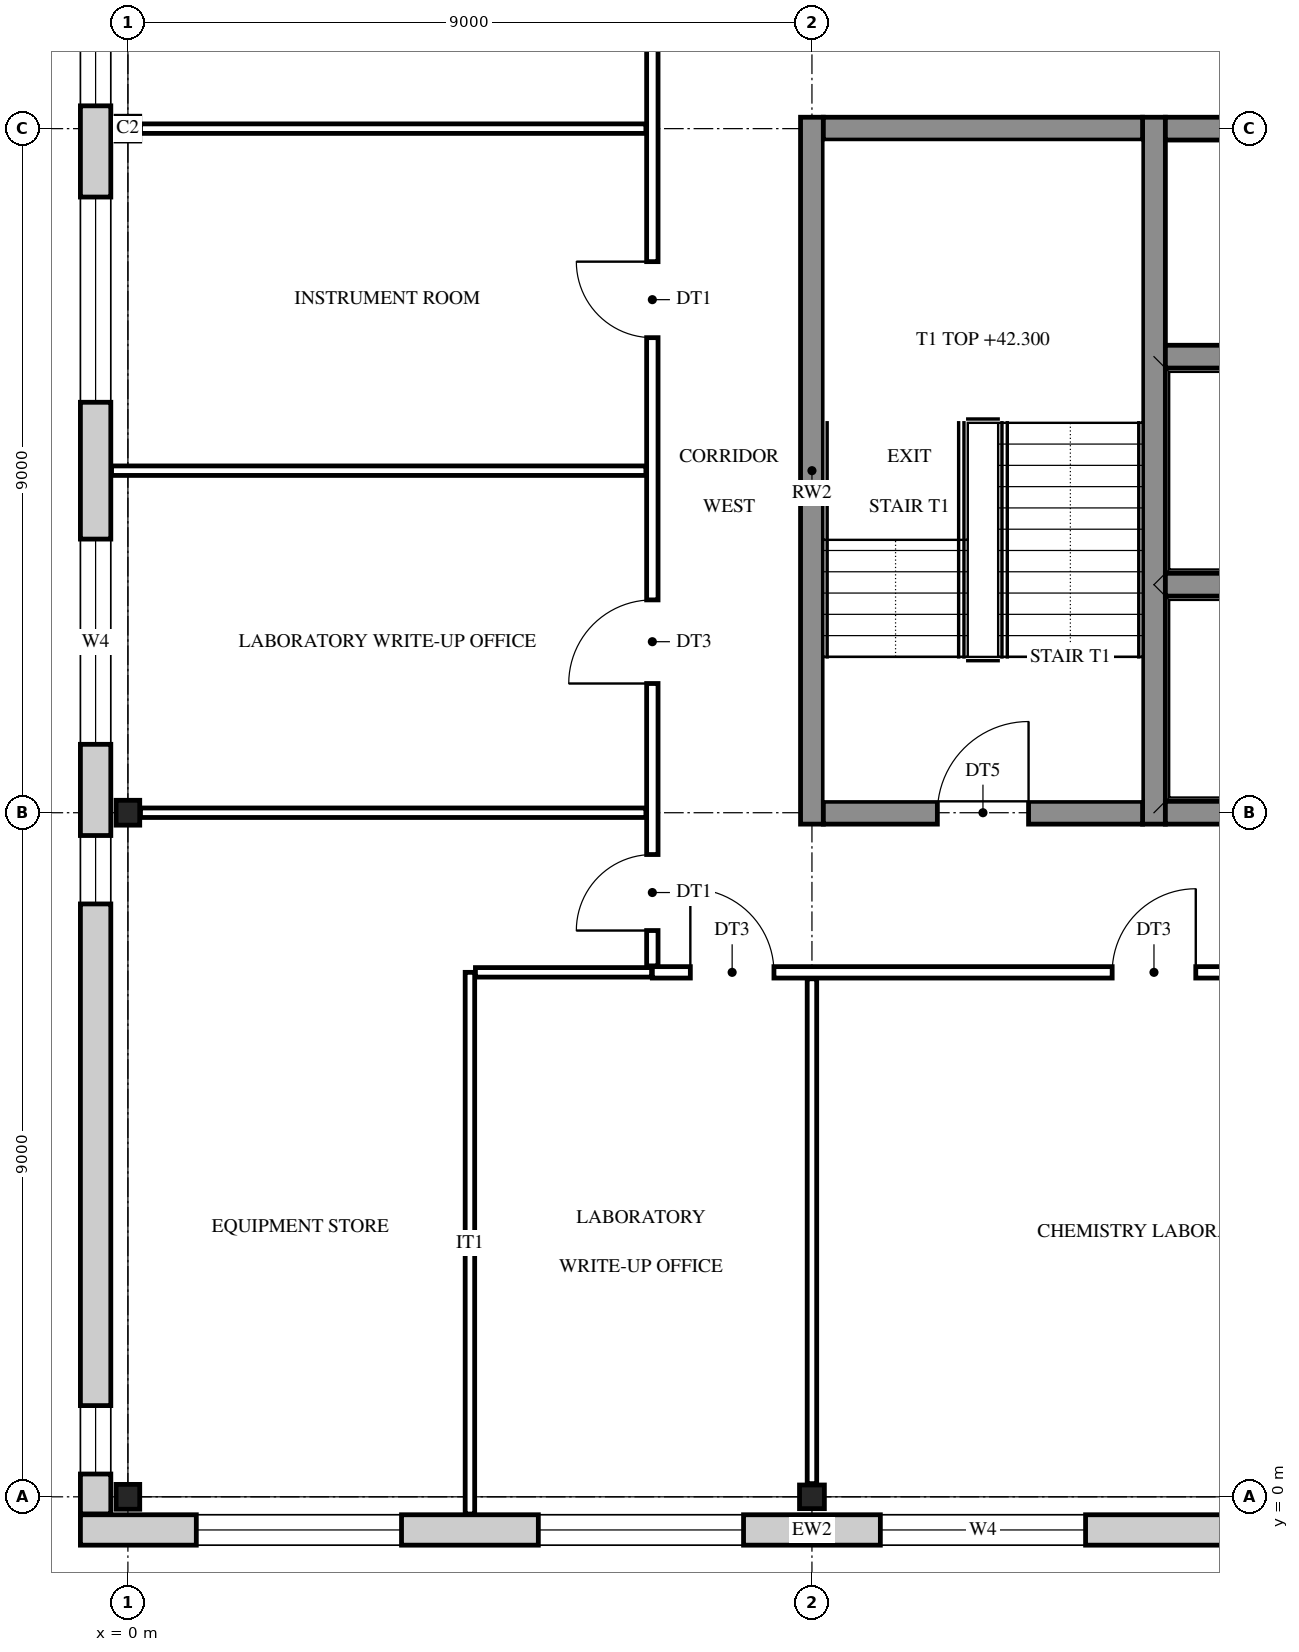
"""IFC4 building model, lengths in metres.
Left out: names, types, materials, properties, quantities, classifications, styles, units other than length and angle.
Written with IfcOpenShell. Run it as: python <this file> out.ifc"""

import sys

from ifc_helpers import new_model, si_unit, direction, frame, frame_2d, origin, origin_2d, place, context, subcontext, project, spatial, rectangle, i_section, extrude, element, fill, save


model = new_model("IFC4")
c1 = context("Model", 3, precision=1e-05, world=origin(), true_north=direction((0.0, 1.0)))
c2 = subcontext(c1, "Body", "Model", "MODEL_VIEW")
j1 = project(units=[si_unit("LENGTHUNIT", "METRE"), si_unit("PLANEANGLEUNIT", "RADIAN")], contexts=[c1])
p1 = place(None, origin())
s1 = spatial("IfcSite", under=j1, at=p1, CompositionType="ELEMENT")
p2 = place(p1, origin())
s2 = spatial("IfcBuilding", under=s1, at=p2, CompositionType="ELEMENT")
p3 = place(p2, frame((0.0, 0.0, 40.2)))
s3 = spatial("IfcBuildingStorey", under=s2, at=p3, CompositionType="ELEMENT", Elevation=40.2)
for number, where, z_axis, x_axis in (
    (1, (0.0, 0.0, 0.0), (0.0, 0.0, 1.0), (1.0, 0.0, 0.0)),
    (2, (0.0, 9.0, 0.0), (0.0, 0.0, 1.0), (1.0, 0.0, 0.0)),
    (3, (0.0, 18.0, 0.0), (0.0, 0.0, 1.0), (1.0, 0.0, 0.0)),
    (4, (9.0, 0.0, 0.0), (0.0, 0.0, 1.0), (0.0, 1.0, 0.0)),
):
    element("IfcColumn", number, at=place(p3, frame(where, z_axis=z_axis, x_axis=x_axis)), inside=s3, PredefinedType="COLUMN", context=c2, shape_type="SweptSolid", body=[
        extrude(i_section(OverallWidth=0.311, OverallDepth=0.327, WebThickness=0.016, FlangeThickness=0.025, FilletRadius=0.017, at=origin_2d()), origin(), (0.0, 0.0, 1.0), 4.2),
    ])
for number, where, z_axis, x_axis in (
    (5, (9.0, 8.85, 0.0), (0.0, 0.0, 1.0), (0.0, 1.0, 0.0)),
    (6, (13.5, 8.85, 0.0), (0.0, 0.0, 1.0), (0.0, 1.0, 0.0)),
):
    element("IfcWall", number, at=place(p3, frame(where, z_axis=z_axis, x_axis=x_axis)), inside=s3, PredefinedType="SHEAR", context=c2, shape_type="SweptSolid", body=[
        extrude(rectangle(XDim=9.3, YDim=0.3, at=frame_2d((4.65, 0.0))), origin(), (0.0, 0.0, 1.0), 4.2),
    ])
p4 = place(p3, frame((9.15, 9.0, 0.0), z_axis=(0.0, 0.0, 1.0), x_axis=(1.0, 0.0, 0.0)))
e7 = element("IfcWall", 7, at=p4, inside=s3, PredefinedType="SHEAR", context=c2, shape_type="SweptSolid", body=[
    extrude(rectangle(XDim=4.2, YDim=0.3, at=frame_2d((2.1, 0.0))), origin(), (0.0, 0.0, 1.0), 4.2),
])
p5 = place(p4, frame((1.5, 0.0, 0.0)))
e8 = element("IfcOpeningElement", 8, at=p5, cuts=e7, PredefinedType="OPENING", context=c2, shape_type="SweptSolid", body=[
    extrude(rectangle(XDim=1.2, YDim=2.1, at=frame_2d((0.6, 1.05))), frame((0.0, 0.16, 0.0), z_axis=(0.0, -1.0, 0.0), x_axis=(1.0, 0.0, 0.0)), (0.0, 0.0, 1.0), 0.32),
])
for number, where, z_axis, x_axis in (
    (9, (13.65, 9.0, 0.0), (0.0, 0.0, 1.0), (1.0, 0.0, 0.0)),
    (10, (13.65, 12.0, 0.0), (0.0, 0.0, 1.0), (1.0, 0.0, 0.0)),
    (11, (13.65, 15.0, 0.0), (0.0, 0.0, 1.0), (1.0, 0.0, 0.0)),
):
    element("IfcWall", number, at=place(p3, frame(where, z_axis=z_axis, x_axis=x_axis)), inside=s3, PredefinedType="SHEAR", context=c2, shape_type="SweptSolid", body=[
        extrude(rectangle(XDim=2.7, YDim=0.3, at=frame_2d((1.35, 0.0))), origin(), (0.0, 0.0, 1.0), 4.2),
    ])
p6 = place(p3, frame((9.15, 18.0, 0.0), z_axis=(0.0, 0.0, 1.0), x_axis=(1.0, 0.0, 0.0)))
e12 = element("IfcWall", 12, at=p6, inside=s3, PredefinedType="SHEAR", context=c2, shape_type="SweptSolid", body=[
    extrude(rectangle(XDim=4.2, YDim=0.3, at=frame_2d((2.1, 0.0))), origin(), (0.0, 0.0, 1.0), 4.2),
])
p7 = place(p3, frame((13.65, 18.0, 0.0), z_axis=(0.0, 0.0, 1.0), x_axis=(1.0, 0.0, 0.0)))
e13 = element("IfcWall", 13, at=p7, inside=s3, PredefinedType="SHEAR", context=c2, shape_type="SweptSolid", body=[
    extrude(rectangle(XDim=2.7, YDim=0.3, at=frame_2d((1.35, 0.0))), origin(), (0.0, 0.0, 1.0), 4.2),
])
p8 = place(p3, frame((32.125, -0.436, 0.0), z_axis=(0.0, 0.0, 1.0), x_axis=(-1.0, 0.0, 0.0)))
e14 = element("IfcWall", 14, at=p8, inside=s3, PredefinedType="STANDARD", context=c2, shape_type="SweptSolid", body=[
    extrude(rectangle(XDim=32.75, YDim=0.4, at=frame_2d((16.375, 0.0))), origin(), (0.0, 0.0, 1.0), 4.2),
])
p9 = place(p8, frame((28.525, 0.0, 0.9)))
e15 = element("IfcOpeningElement", 15, at=p9, cuts=e14, PredefinedType="OPENING", context=c2, shape_type="SweptSolid", body=[
    extrude(rectangle(XDim=2.7, YDim=2.5, at=frame_2d((1.35, 1.25))), frame((0.0, 0.21, 0.0), z_axis=(0.0, -1.0, 0.0), x_axis=(1.0, 0.0, 0.0)), (0.0, 0.0, 1.0), 0.42),
])
p10 = place(p8, frame((24.025, 0.0, 0.9)))
e16 = element("IfcOpeningElement", 16, at=p10, cuts=e14, PredefinedType="OPENING", context=c2, shape_type="SweptSolid", body=[
    extrude(rectangle(XDim=2.7, YDim=2.5, at=frame_2d((1.35, 1.25))), frame((0.0, 0.21, 0.0), z_axis=(0.0, -1.0, 0.0), x_axis=(1.0, 0.0, 0.0)), (0.0, 0.0, 1.0), 0.42),
])
p11 = place(p8, frame((19.525, 0.0, 0.9)))
e17 = element("IfcOpeningElement", 17, at=p11, cuts=e14, PredefinedType="OPENING", context=c2, shape_type="SweptSolid", body=[
    extrude(rectangle(XDim=2.7, YDim=2.5, at=frame_2d((1.35, 1.25))), frame((0.0, 0.21, 0.0), z_axis=(0.0, -1.0, 0.0), x_axis=(1.0, 0.0, 0.0)), (0.0, 0.0, 1.0), 0.42),
])
p12 = place(p8, frame((15.025, 0.0, 0.9)))
e18 = element("IfcOpeningElement", 18, at=p12, cuts=e14, PredefinedType="OPENING", context=c2, shape_type="SweptSolid", body=[
    extrude(rectangle(XDim=2.7, YDim=2.5, at=frame_2d((1.35, 1.25))), frame((0.0, 0.21, 0.0), z_axis=(0.0, -1.0, 0.0), x_axis=(1.0, 0.0, 0.0)), (0.0, 0.0, 1.0), 0.42),
])
p13 = place(p8, frame((10.525, 0.0, 0.9)))
e19 = element("IfcOpeningElement", 19, at=p13, cuts=e14, PredefinedType="OPENING", context=c2, shape_type="SweptSolid", body=[
    extrude(rectangle(XDim=2.7, YDim=2.5, at=frame_2d((1.35, 1.25))), frame((0.0, 0.21, 0.0), z_axis=(0.0, -1.0, 0.0), x_axis=(1.0, 0.0, 0.0)), (0.0, 0.0, 1.0), 0.42),
])
p14 = place(p8, frame((6.025, 0.0, 0.9)))
e20 = element("IfcOpeningElement", 20, at=p14, cuts=e14, PredefinedType="OPENING", context=c2, shape_type="SweptSolid", body=[
    extrude(rectangle(XDim=2.7, YDim=2.5, at=frame_2d((1.35, 1.25))), frame((0.0, 0.21, 0.0), z_axis=(0.0, -1.0, 0.0), x_axis=(1.0, 0.0, 0.0)), (0.0, 0.0, 1.0), 0.42),
])
p15 = place(p8, frame((1.525, 0.0, 0.9)))
e21 = element("IfcOpeningElement", 21, at=p15, cuts=e14, PredefinedType="OPENING", context=c2, shape_type="SweptSolid", body=[
    extrude(rectangle(XDim=2.7, YDim=2.5, at=frame_2d((1.35, 1.25))), frame((0.0, 0.21, 0.0), z_axis=(0.0, -1.0, 0.0), x_axis=(1.0, 0.0, 0.0)), (0.0, 0.0, 1.0), 0.42),
])
p16 = place(p3, frame((-0.425, -0.225, 0.0), z_axis=(0.0, 0.0, 1.0), x_axis=(0.0, 1.0, 0.0)))
e22 = element("IfcWall", 22, at=p16, inside=s3, PredefinedType="STANDARD", context=c2, shape_type="SweptSolid", body=[
    extrude(rectangle(XDim=27.45, YDim=0.4, at=frame_2d((13.725, 0.0))), origin(), (0.0, 0.0, 1.0), 4.2),
])
p17 = place(p16, frame((0.525, 0.0, 0.9)))
e23 = element("IfcOpeningElement", 23, at=p17, cuts=e22, PredefinedType="OPENING", context=c2, shape_type="SweptSolid", body=[
    extrude(rectangle(XDim=0.9, YDim=2.0, at=frame_2d((0.45, 1.0))), frame((0.0, 0.21, 0.0), z_axis=(0.0, -1.0, 0.0), x_axis=(1.0, 0.0, 0.0)), (0.0, 0.0, 1.0), 0.42),
])
p18 = place(p16, frame((8.025, 0.0, 0.9)))
e24 = element("IfcOpeningElement", 24, at=p18, cuts=e22, PredefinedType="OPENING", context=c2, shape_type="SweptSolid", body=[
    extrude(rectangle(XDim=0.9, YDim=2.0, at=frame_2d((0.45, 1.0))), frame((0.0, 0.21, 0.0), z_axis=(0.0, -1.0, 0.0), x_axis=(1.0, 0.0, 0.0)), (0.0, 0.0, 1.0), 0.42),
])
p19 = place(p16, frame((10.125, 0.0, 0.9)))
e25 = element("IfcOpeningElement", 25, at=p19, cuts=e22, PredefinedType="OPENING", context=c2, shape_type="SweptSolid", body=[
    extrude(rectangle(XDim=2.7, YDim=2.5, at=frame_2d((1.35, 1.25))), frame((0.0, 0.21, 0.0), z_axis=(0.0, -1.0, 0.0), x_axis=(1.0, 0.0, 0.0)), (0.0, 0.0, 1.0), 0.42),
])
p20 = place(p16, frame((14.625, 0.0, 0.9)))
e26 = element("IfcOpeningElement", 26, at=p20, cuts=e22, PredefinedType="OPENING", context=c2, shape_type="SweptSolid", body=[
    extrude(rectangle(XDim=2.7, YDim=2.5, at=frame_2d((1.35, 1.25))), frame((0.0, 0.21, 0.0), z_axis=(0.0, -1.0, 0.0), x_axis=(1.0, 0.0, 0.0)), (0.0, 0.0, 1.0), 0.42),
])
p21 = place(p16, frame((18.525, 0.0, 0.9)))
e27 = element("IfcOpeningElement", 27, at=p21, cuts=e22, PredefinedType="OPENING", context=c2, shape_type="SweptSolid", body=[
    extrude(rectangle(XDim=0.9, YDim=2.0, at=frame_2d((0.45, 1.0))), frame((0.0, 0.21, 0.0), z_axis=(0.0, -1.0, 0.0), x_axis=(1.0, 0.0, 0.0)), (0.0, 0.0, 1.0), 0.42),
])
p22 = place(p16, frame((26.025, 0.0, 0.9)))
e28 = element("IfcOpeningElement", 28, at=p22, cuts=e22, PredefinedType="OPENING", context=c2, shape_type="SweptSolid", body=[
    extrude(rectangle(XDim=0.9, YDim=2.0, at=frame_2d((0.45, 1.0))), frame((0.0, 0.21, 0.0), z_axis=(0.0, -1.0, 0.0), x_axis=(1.0, 0.0, 0.0)), (0.0, 0.0, 1.0), 0.42),
])
p23 = place(p3, frame((4.5, -0.226, 0.0), z_axis=(0.0, 0.0, 1.0), x_axis=(0.0, 1.0, 0.0)))
e29 = element("IfcWall", 29, at=p23, inside=s3, PredefinedType="PARTITIONING", context=c2, shape_type="SweptSolid", body=[
    extrude(rectangle(XDim=7.126, YDim=0.125, at=frame_2d((3.563, 0.0))), origin(), (0.0, 0.0, 1.0), 3.537),
])
p24 = place(p3, frame((6.9, 6.985, 0.0), z_axis=(0.0, 0.0, 1.0), x_axis=(0.0, 1.0, 0.0)))
e30 = element("IfcWall", 30, at=p24, inside=s3, PredefinedType="PARTITIONING", context=c2, shape_type="SweptSolid", body=[
    extrude(rectangle(XDim=13.03, YDim=0.15, at=frame_2d((6.515, 0.0))), origin(), (0.0, 0.0, 1.0), 3.537),
])
p25 = place(p24, frame((0.465, 0.0, 0.0)))
e31 = element("IfcOpeningElement", 31, at=p25, cuts=e30, PredefinedType="OPENING", context=c2, shape_type="SweptSolid", body=[
    extrude(rectangle(XDim=1.0, YDim=2.1, at=frame_2d((0.5, 1.05))), frame((0.0, 0.085, 0.0), z_axis=(0.0, -1.0, 0.0), x_axis=(1.0, 0.0, 0.0)), (0.0, 0.0, 1.0), 0.17),
])
p26 = place(p24, frame((3.715, 0.0, 0.0)))
e32 = element("IfcOpeningElement", 32, at=p26, cuts=e30, PredefinedType="OPENING", context=c2, shape_type="SweptSolid", body=[
    extrude(rectangle(XDim=1.1, YDim=2.1, at=frame_2d((0.55, 1.05))), frame((0.0, 0.085, 0.0), z_axis=(0.0, -1.0, 0.0), x_axis=(1.0, 0.0, 0.0)), (0.0, 0.0, 1.0), 0.17),
])
p27 = place(p24, frame((8.265, 0.0, 0.0)))
e33 = element("IfcOpeningElement", 33, at=p27, cuts=e30, PredefinedType="OPENING", context=c2, shape_type="SweptSolid", body=[
    extrude(rectangle(XDim=1.0, YDim=2.1, at=frame_2d((0.5, 1.05))), frame((0.0, 0.085, 0.0), z_axis=(0.0, -1.0, 0.0), x_axis=(1.0, 0.0, 0.0)), (0.0, 0.0, 1.0), 0.17),
])
p28 = place(p3, frame((9.0, 0.174, 0.0), z_axis=(0.0, 0.0, 1.0), x_axis=(0.0, 1.0, 0.0)))
e34 = element("IfcWall", 34, at=p28, inside=s3, PredefinedType="PARTITIONING", context=c2, shape_type="SweptSolid", body=[
    extrude(rectangle(XDim=6.641, YDim=0.125, at=frame_2d((3.321, 0.0))), origin(), (0.0, 0.0, 1.0), 3.537),
])
p29 = place(p3, frame((4.573, 6.9, 0.0), z_axis=(0.0, 0.0, 1.0), x_axis=(1.0, 0.0, 0.0)))
e35 = element("IfcWall", 35, at=p29, inside=s3, PredefinedType="PARTITIONING", context=c2, shape_type="SweptSolid", body=[
    extrude(rectangle(XDim=2.317, YDim=0.125, at=frame_2d((1.159, 0.0))), origin(), (0.0, 0.0, 1.0), 3.537),
])
p30 = place(p3, frame((6.9, 6.9, 0.0), z_axis=(0.0, 0.0, 1.0), x_axis=(1.0, 0.0, 0.0)))
e36 = element("IfcWall", 36, at=p30, inside=s3, PredefinedType="PARTITIONING", context=c2, shape_type="SweptSolid", body=[
    extrude(rectangle(XDim=20.1, YDim=0.15, at=frame_2d((10.05, 0.0))), origin(), (0.0, 0.0, 1.0), 3.537),
])
p31 = place(p30, frame((0.5, 0.0, 0.0)))
e37 = element("IfcOpeningElement", 37, at=p31, cuts=e36, PredefinedType="OPENING", context=c2, shape_type="SweptSolid", body=[
    extrude(rectangle(XDim=1.1, YDim=2.1, at=frame_2d((0.55, 1.05))), frame((0.0, 0.085, 0.0), z_axis=(0.0, -1.0, 0.0), x_axis=(1.0, 0.0, 0.0)), (0.0, 0.0, 1.0), 0.17),
])
p32 = place(p30, frame((6.05, 0.0, 0.0)))
e38 = element("IfcOpeningElement", 38, at=p32, cuts=e36, PredefinedType="OPENING", context=c2, shape_type="SweptSolid", body=[
    extrude(rectangle(XDim=1.1, YDim=2.1, at=frame_2d((0.55, 1.05))), frame((0.0, 0.085, 0.0), z_axis=(0.0, -1.0, 0.0), x_axis=(1.0, 0.0, 0.0)), (0.0, 0.0, 1.0), 0.17),
])
p33 = place(p30, frame((12.85, 0.0, 0.0)))
e39 = element("IfcOpeningElement", 39, at=p33, cuts=e36, PredefinedType="OPENING", context=c2, shape_type="SweptSolid", body=[
    extrude(rectangle(XDim=1.0, YDim=2.1, at=frame_2d((0.5, 1.05))), frame((0.0, 0.085, 0.0), z_axis=(0.0, -1.0, 0.0), x_axis=(1.0, 0.0, 0.0)), (0.0, 0.0, 1.0), 0.17),
])
p34 = place(p30, frame((18.55, 0.0, 0.0)))
e40 = element("IfcOpeningElement", 40, at=p34, cuts=e36, PredefinedType="OPENING", context=c2, shape_type="SweptSolid", body=[
    extrude(rectangle(XDim=1.0, YDim=2.1, at=frame_2d((0.5, 1.05))), frame((0.0, 0.085, 0.0), z_axis=(0.0, -1.0, 0.0), x_axis=(1.0, 0.0, 0.0)), (0.0, 0.0, 1.0), 0.17),
])
p35 = place(p3, frame((0.166, 9.0, 0.0), z_axis=(0.0, 0.0, 1.0), x_axis=(1.0, 0.0, 0.0)))
e41 = element("IfcWall", 41, at=p35, inside=s3, PredefinedType="PARTITIONING", context=c2, shape_type="SweptSolid", body=[
    extrude(rectangle(XDim=6.649, YDim=0.125, at=frame_2d((3.325, 0.0))), origin(), (0.0, 0.0, 1.0), 3.537),
])
p36 = place(p3, frame((-0.215, 13.5, 0.0), z_axis=(0.0, 0.0, 1.0), x_axis=(1.0, 0.0, 0.0)))
e42 = element("IfcWall", 42, at=p36, inside=s3, PredefinedType="PARTITIONING", context=c2, shape_type="SweptSolid", body=[
    extrude(rectangle(XDim=7.03, YDim=0.125, at=frame_2d((3.515, 0.0))), origin(), (0.0, 0.0, 1.0), 3.537),
])
p37 = place(p3, frame((0.166, 18.0, 0.0), z_axis=(0.0, 0.0, 1.0), x_axis=(1.0, 0.0, 0.0)))
e43 = element("IfcWall", 43, at=p37, inside=s3, PredefinedType="PARTITIONING", context=c2, shape_type="SweptSolid", body=[
    extrude(rectangle(XDim=6.649, YDim=0.125, at=frame_2d((3.325, 0.0))), origin(), (0.0, 0.0, 1.0), 3.537),
])
p38 = place(p9, origin())
e44 = element("IfcWindow", 44, at=p38, inside=s3, PartitioningType="SINGLE_PANEL", PredefinedType="WINDOW", context=c2, shape_type="SweptSolid", body=[
    extrude(rectangle(XDim=2.7, YDim=2.5, at=frame_2d((1.35, 1.25))), frame((0.0, 0.03, 0.0), z_axis=(0.0, -1.0, 0.0), x_axis=(1.0, 0.0, 0.0)), (0.0, 0.0, 1.0), 0.06),
])
fill(e15, e44)
p39 = place(p10, origin())
e45 = element("IfcWindow", 45, at=p39, inside=s3, PartitioningType="SINGLE_PANEL", PredefinedType="WINDOW", context=c2, shape_type="SweptSolid", body=[
    extrude(rectangle(XDim=2.7, YDim=2.5, at=frame_2d((1.35, 1.25))), frame((0.0, 0.03, 0.0), z_axis=(0.0, -1.0, 0.0), x_axis=(1.0, 0.0, 0.0)), (0.0, 0.0, 1.0), 0.06),
])
fill(e16, e45)
p40 = place(p11, origin())
e46 = element("IfcWindow", 46, at=p40, inside=s3, PartitioningType="SINGLE_PANEL", PredefinedType="WINDOW", context=c2, shape_type="SweptSolid", body=[
    extrude(rectangle(XDim=2.7, YDim=2.5, at=frame_2d((1.35, 1.25))), frame((0.0, 0.03, 0.0), z_axis=(0.0, -1.0, 0.0), x_axis=(1.0, 0.0, 0.0)), (0.0, 0.0, 1.0), 0.06),
])
fill(e17, e46)
p41 = place(p17, origin())
e47 = element("IfcWindow", 47, at=p41, inside=s3, PartitioningType="SINGLE_PANEL", PredefinedType="WINDOW", context=c2, shape_type="SweptSolid", body=[
    extrude(rectangle(XDim=0.9, YDim=2.0, at=frame_2d((0.45, 1.0))), frame((0.0, 0.03, 0.0), z_axis=(0.0, -1.0, 0.0), x_axis=(1.0, 0.0, 0.0)), (0.0, 0.0, 1.0), 0.06),
])
fill(e23, e47)
p42 = place(p18, origin())
e48 = element("IfcWindow", 48, at=p42, inside=s3, PartitioningType="SINGLE_PANEL", PredefinedType="WINDOW", context=c2, shape_type="SweptSolid", body=[
    extrude(rectangle(XDim=0.9, YDim=2.0, at=frame_2d((0.45, 1.0))), frame((0.0, 0.03, 0.0), z_axis=(0.0, -1.0, 0.0), x_axis=(1.0, 0.0, 0.0)), (0.0, 0.0, 1.0), 0.06),
])
fill(e24, e48)
p43 = place(p19, origin())
e49 = element("IfcWindow", 49, at=p43, inside=s3, PartitioningType="SINGLE_PANEL", PredefinedType="WINDOW", context=c2, shape_type="SweptSolid", body=[
    extrude(rectangle(XDim=2.7, YDim=2.5, at=frame_2d((1.35, 1.25))), frame((0.0, 0.03, 0.0), z_axis=(0.0, -1.0, 0.0), x_axis=(1.0, 0.0, 0.0)), (0.0, 0.0, 1.0), 0.06),
])
fill(e25, e49)
p44 = place(p20, origin())
e50 = element("IfcWindow", 50, at=p44, inside=s3, PartitioningType="SINGLE_PANEL", PredefinedType="WINDOW", context=c2, shape_type="SweptSolid", body=[
    extrude(rectangle(XDim=2.7, YDim=2.5, at=frame_2d((1.35, 1.25))), frame((0.0, 0.03, 0.0), z_axis=(0.0, -1.0, 0.0), x_axis=(1.0, 0.0, 0.0)), (0.0, 0.0, 1.0), 0.06),
])
fill(e26, e50)
p45 = place(p21, origin())
e51 = element("IfcWindow", 51, at=p45, inside=s3, PartitioningType="SINGLE_PANEL", PredefinedType="WINDOW", context=c2, shape_type="SweptSolid", body=[
    extrude(rectangle(XDim=0.9, YDim=2.0, at=frame_2d((0.45, 1.0))), frame((0.0, 0.03, 0.0), z_axis=(0.0, -1.0, 0.0), x_axis=(1.0, 0.0, 0.0)), (0.0, 0.0, 1.0), 0.06),
])
fill(e27, e51)
p46 = place(p5, origin())
e52 = element("IfcDoor", 52, at=p46, inside=s3, OperationType="SINGLE_SWING_RIGHT", PredefinedType="DOOR", context=c2, shape_type="SweptSolid", body=[
    extrude(rectangle(XDim=1.2, YDim=2.1, at=frame_2d((0.6, 1.05))), frame((0.0, 0.025, 0.0), z_axis=(0.0, -1.0, 0.0), x_axis=(1.0, 0.0, 0.0)), (0.0, 0.0, 1.0), 0.05),
])
fill(e8, e52)
p47 = place(p25, origin())
e53 = element("IfcDoor", 53, at=p47, inside=s3, OperationType="SINGLE_SWING_LEFT", PredefinedType="DOOR", context=c2, shape_type="SweptSolid", body=[
    extrude(rectangle(XDim=1.0, YDim=2.1, at=frame_2d((0.5, 1.05))), frame((0.0, 0.025, 0.0), z_axis=(0.0, -1.0, 0.0), x_axis=(1.0, 0.0, 0.0)), (0.0, 0.0, 1.0), 0.05),
])
fill(e31, e53)
p48 = place(p31, frame((1.1, 0.0, 0.0), z_axis=(0.0, 0.0, 1.0), x_axis=(-1.0, 0.0, 0.0)))
e54 = element("IfcDoor", 54, at=p48, inside=s3, OperationType="SINGLE_SWING_LEFT", PredefinedType="DOOR", context=c2, shape_type="SweptSolid", body=[
    extrude(rectangle(XDim=1.1, YDim=2.1, at=frame_2d((0.55, 1.05))), frame((0.0, 0.025, 0.0), z_axis=(0.0, -1.0, 0.0), x_axis=(1.0, 0.0, 0.0)), (0.0, 0.0, 1.0), 0.05),
])
fill(e37, e54)
p49 = place(p32, frame((1.1, 0.0, 0.0), z_axis=(0.0, 0.0, 1.0), x_axis=(-1.0, 0.0, 0.0)))
e55 = element("IfcDoor", 55, at=p49, inside=s3, OperationType="SINGLE_SWING_RIGHT", PredefinedType="DOOR", context=c2, shape_type="SweptSolid", body=[
    extrude(rectangle(XDim=1.1, YDim=2.1, at=frame_2d((0.55, 1.05))), frame((0.0, 0.025, 0.0), z_axis=(0.0, -1.0, 0.0), x_axis=(1.0, 0.0, 0.0)), (0.0, 0.0, 1.0), 0.05),
])
fill(e38, e55)
p50 = place(p26, origin())
e56 = element("IfcDoor", 56, at=p50, inside=s3, OperationType="SINGLE_SWING_LEFT", PredefinedType="DOOR", context=c2, shape_type="SweptSolid", body=[
    extrude(rectangle(XDim=1.1, YDim=2.1, at=frame_2d((0.55, 1.05))), frame((0.0, 0.025, 0.0), z_axis=(0.0, -1.0, 0.0), x_axis=(1.0, 0.0, 0.0)), (0.0, 0.0, 1.0), 0.05),
])
fill(e32, e56)
p51 = place(p27, origin())
e57 = element("IfcDoor", 57, at=p51, inside=s3, OperationType="SINGLE_SWING_RIGHT", PredefinedType="DOOR", context=c2, shape_type="SweptSolid", body=[
    extrude(rectangle(XDim=1.0, YDim=2.1, at=frame_2d((0.5, 1.05))), frame((0.0, 0.025, 0.0), z_axis=(0.0, -1.0, 0.0), x_axis=(1.0, 0.0, 0.0)), (0.0, 0.0, 1.0), 0.05),
])
fill(e33, e57)
save(model, sys.argv[1])
